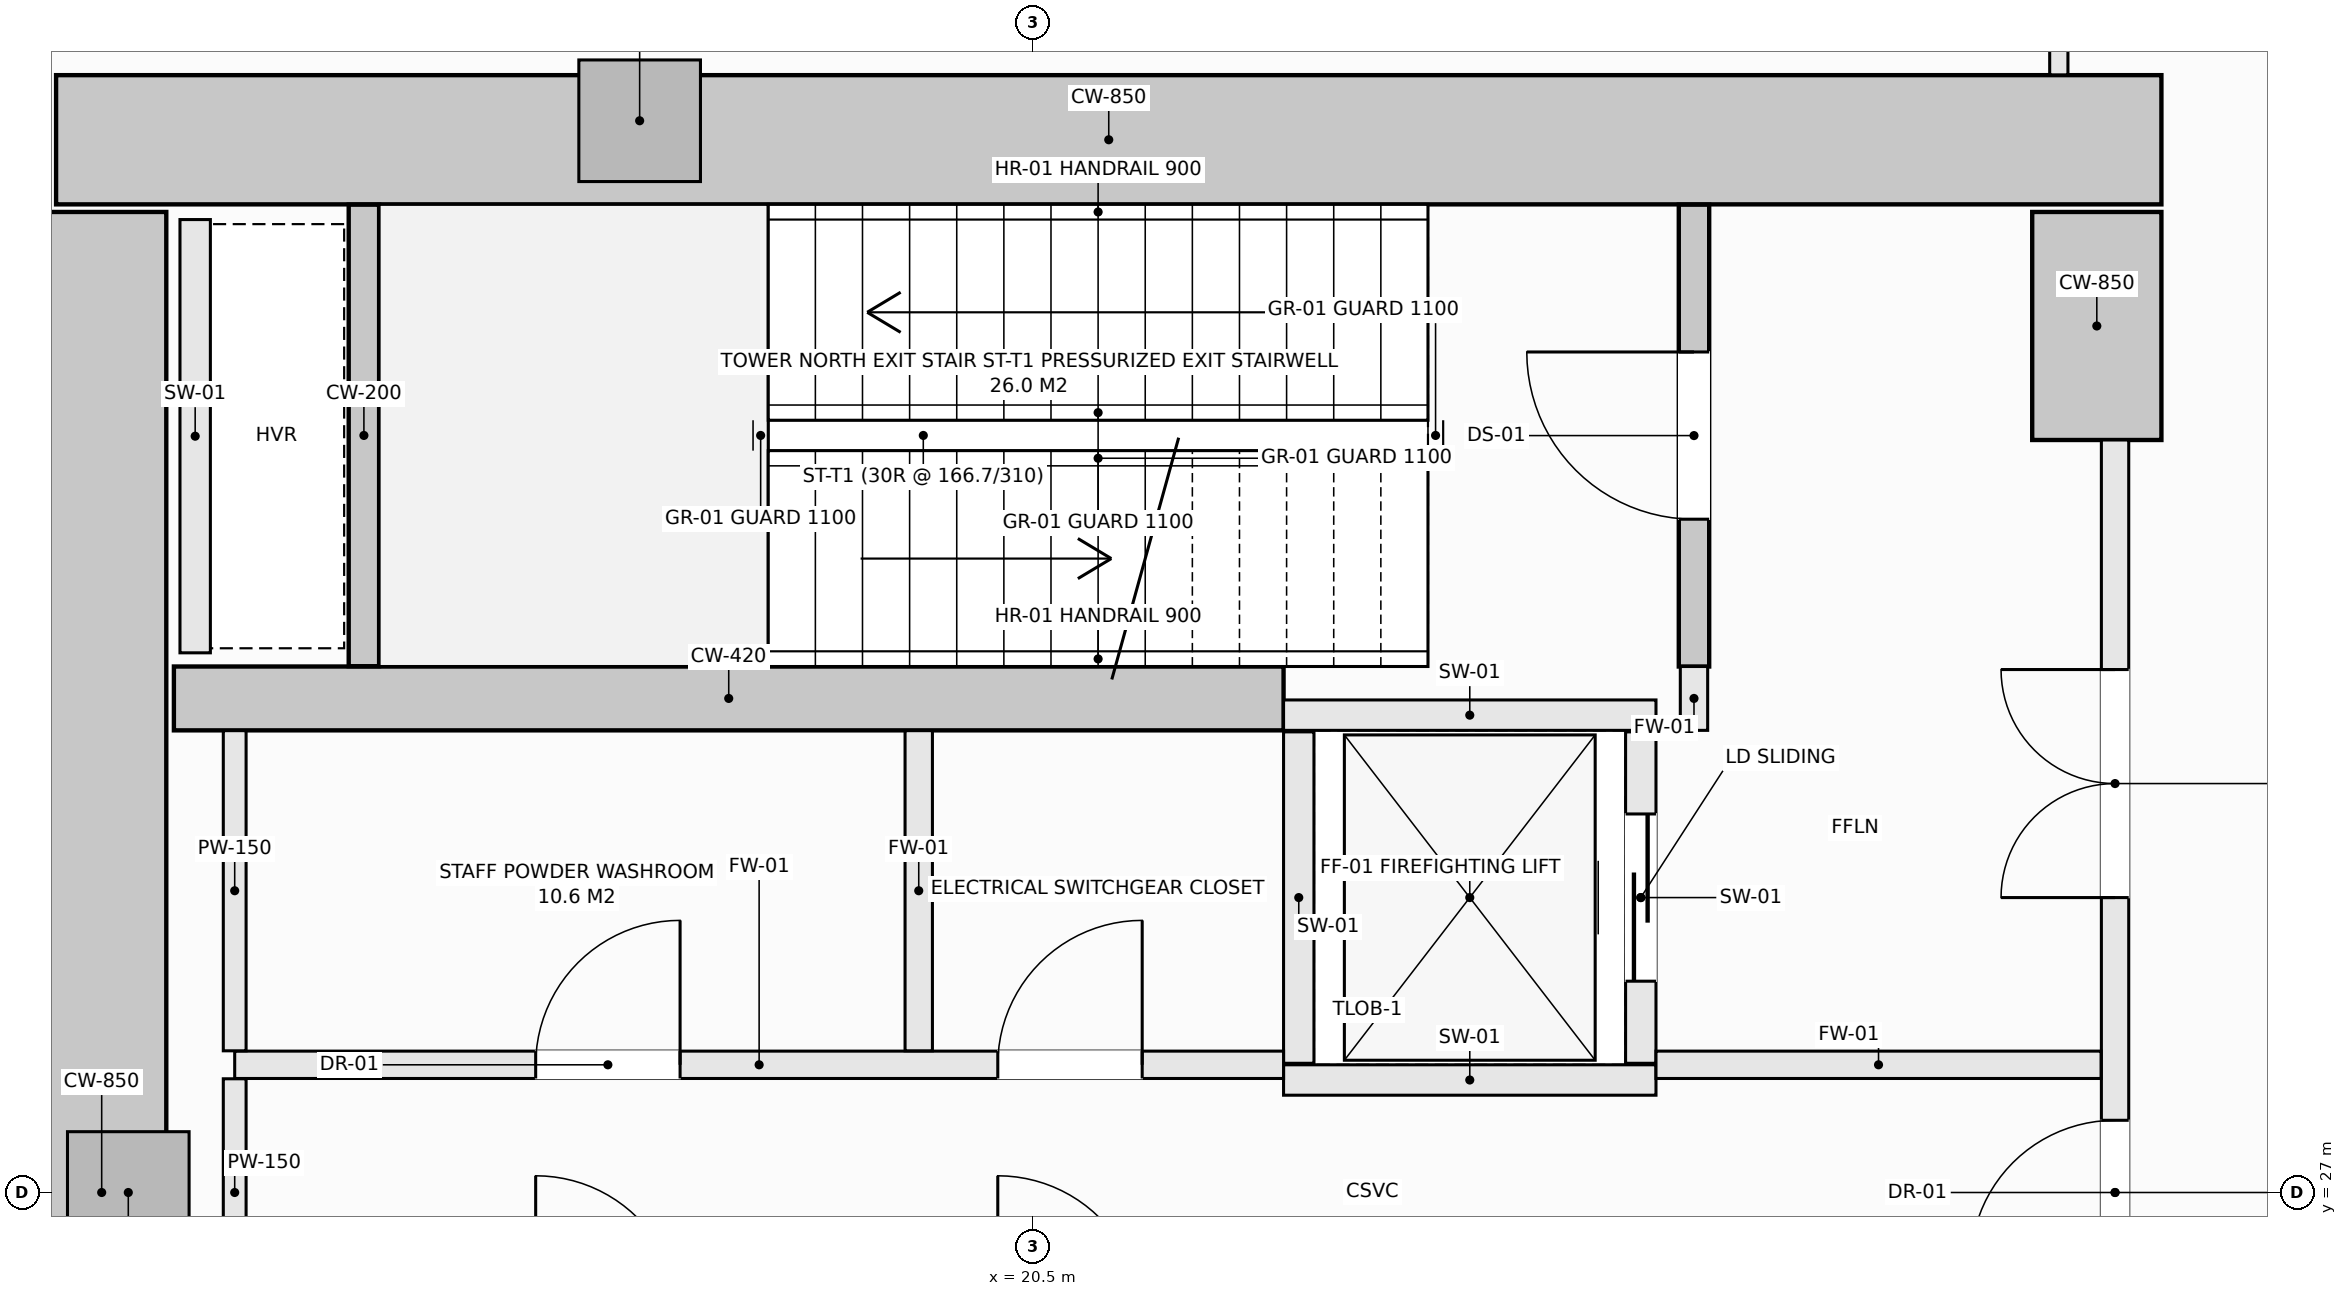
"""IFC4 building model, lengths in metres.
Left out: names, types, materials, properties, quantities, classifications, styles, units other than length and angle.
Written with IfcOpenShell. Run it as: python <this file> out.ifc"""

import sys

from ifc_helpers import new_model, si_unit, direction, frame, frame_2d, origin, origin_2d, place, context, subcontext, project, spatial, rectangle, extrude, element, fill, save


model = new_model("IFC4")
c1 = context("Model", 3, precision=1e-05, world=origin(), true_north=direction((0.0, 1.0)))
c2 = subcontext(c1, "Body", "Model", "MODEL_VIEW")
j1 = project(units=[si_unit("LENGTHUNIT", "METRE"), si_unit("PLANEANGLEUNIT", "RADIAN")], contexts=[c1])
p1 = place(None, origin())
s1 = spatial("IfcSite", under=j1, at=p1, CompositionType="ELEMENT")
p2 = place(p1, origin())
s2 = spatial("IfcBuilding", under=s1, at=p2, CompositionType="ELEMENT")
p3 = place(p2, origin())
s3 = spatial("IfcBuildingStorey", under=s2, at=p3, CompositionType="ELEMENT", Elevation=0.0)
p4 = place(p3, frame((14.075, 33.925, -0.36), z_axis=(0.0, 0.0, 1.0), x_axis=(1.0, 0.0, 0.0)))
e1 = element("IfcWall", 1, at=p4, inside=s3, PredefinedType="SHEAR", context=c2, shape_type="SweptSolid", body=[
    extrude(rectangle(XDim=13.85, YDim=0.85, at=frame_2d((6.925, 0.0))), origin(), (0.0, 0.0, 1.0), 5.1),
])
p5 = place(p3, frame((14.375, 20.55, -0.36), z_axis=(0.0, 0.0, 1.0), x_axis=(0.0, 1.0, 0.0)))
e2 = element("IfcWall", 2, at=p5, inside=s3, PredefinedType="SHEAR", context=c2, shape_type="SweptSolid", body=[
    extrude(rectangle(XDim=12.9, YDim=0.85, at=frame_2d((6.45, 0.0))), origin(), (0.0, 0.0, 1.0), 5.1),
])
p6 = place(p3, frame((27.5, 31.95, -0.36), z_axis=(0.0, 0.0, 1.0), x_axis=(0.0, 1.0, 0.0)))
e3 = element("IfcWall", 3, at=p6, inside=s3, PredefinedType="SHEAR", context=c2, shape_type="SweptSolid", body=[
    extrude(rectangle(XDim=1.5, YDim=0.85, at=frame_2d((0.75, 0.0))), origin(), (0.0, 0.0, 1.0), 5.1),
])
p7 = place(p3, frame((14.85, 30.25, -0.36), z_axis=(0.0, 0.0, 1.0), x_axis=(1.0, 0.0, 0.0)))
e4 = element("IfcWall", 4, at=p7, inside=s3, PredefinedType="SHEAR", context=c2, shape_type="SweptSolid", body=[
    extrude(rectangle(XDim=7.3, YDim=0.42, at=frame_2d((3.65, 0.0))), origin(), (0.0, 0.0, 1.0), 5.1),
])
for number, where, z_axis, x_axis in (
    (5, (17.914, 34.05, -0.36), (0.0, 0.0, 1.0), (1.0, 0.0, 0.0)),
    (6, (14.55, 27.0, -0.36), (0.0, 0.0, 1.0), (1.0, 0.0, 0.0)),
):
    element("IfcColumn", number, at=place(p3, frame(where, z_axis=z_axis, x_axis=x_axis)), inside=s3, PredefinedType="PILASTER", context=c2, shape_type="SweptSolid", body=[
        extrude(rectangle(XDim=0.8, YDim=0.8, at=origin_2d()), origin(), (0.0, 0.0, 1.0), 5.1),
    ])
p8 = place(p3, frame((24.85, 30.46, -0.36), z_axis=(0.0, 0.0, 1.0), x_axis=(0.0, 1.0, 0.0)))
e7 = element("IfcWall", 7, at=p8, inside=s3, PredefinedType="SHEAR", context=c2, shape_type="SweptSolid", body=[
    extrude(rectangle(XDim=3.038, YDim=0.2, at=frame_2d((1.519, 0.0))), origin(), (0.0, 0.0, 1.0), 5.1),
])
p9 = place(p8, frame((0.969, 0.0, 0.36)))
e8 = element("IfcOpeningElement", 8, at=p9, cuts=e7, PredefinedType="OPENING", context=c2, shape_type="SweptSolid", body=[
    extrude(rectangle(XDim=1.1, YDim=2.15, at=frame_2d((0.55, 1.075))), frame((0.0, 0.11, 0.0), z_axis=(0.0, -1.0, 0.0), x_axis=(1.0, 0.0, 0.0)), (0.0, 0.0, 1.0), 0.22),
])
p10 = place(p3, frame((16.1, 30.462, -0.36), z_axis=(0.0, 0.0, 1.0), x_axis=(0.0, 1.0, 0.0)))
e9 = element("IfcWall", 9, at=p10, inside=s3, PredefinedType="SHEAR", context=c2, shape_type="SweptSolid", body=[
    extrude(rectangle(XDim=3.036, YDim=0.2, at=frame_2d((1.518, 0.0))), origin(), (0.0, 0.0, 1.0), 5.1),
])
for number, where, z_axis, x_axis in (
    (10, (22.15, 30.14, 0.0), (0.0, 0.0, 1.0), (1.0, 0.0, 0.0)),
    (11, (22.15, 27.74, 0.0), (0.0, 0.0, 1.0), (1.0, 0.0, 0.0)),
):
    element("IfcWall", number, at=place(p3, frame(where, z_axis=z_axis, x_axis=x_axis)), inside=s3, PredefinedType="SOLIDWALL", context=c2, shape_type="SweptSolid", body=[
        extrude(rectangle(XDim=2.45, YDim=0.2, at=frame_2d((1.225, 0.0))), origin(), (0.0, 0.0, 1.0), 4.74),
    ])
p11 = place(p3, frame((22.25, 27.85, 0.0), z_axis=(0.0, 0.0, 1.0), x_axis=(0.0, 1.0, 0.0)))
e12 = element("IfcWall", 12, at=p11, inside=s3, PredefinedType="SOLIDWALL", context=c2, shape_type="SweptSolid", body=[
    extrude(rectangle(XDim=2.18, YDim=0.2, at=frame_2d((1.09, 0.0))), origin(), (0.0, 0.0, 1.0), 4.74),
])
p12 = place(p3, frame((24.5, 27.85, 0.0), z_axis=(0.0, 0.0, 1.0), x_axis=(0.0, 1.0, 0.0)))
e13 = element("IfcWall", 13, at=p12, inside=s3, PredefinedType="SOLIDWALL", context=c2, shape_type="SweptSolid", body=[
    extrude(rectangle(XDim=2.18, YDim=0.2, at=frame_2d((1.09, 0.0))), origin(), (0.0, 0.0, 1.0), 4.74),
])
p13 = place(p12, frame((0.54, 0.0, 0.0)))
e14 = element("IfcOpeningElement", 14, at=p13, cuts=e13, PredefinedType="OPENING", context=c2, shape_type="SweptSolid", body=[
    extrude(rectangle(XDim=1.1, YDim=2.2, at=frame_2d((0.55, 1.1))), frame((0.0, 0.11, 0.0), z_axis=(0.0, -1.0, 0.0), x_axis=(1.0, 0.0, 0.0)), (0.0, 0.0, 1.0), 0.22),
])
p14 = place(p3, frame((14.99, 30.55, 0.0), z_axis=(0.0, 0.0, 1.0), x_axis=(0.0, 1.0, 0.0)))
e15 = element("IfcWall", 15, at=p14, inside=s3, PredefinedType="SOLIDWALL", context=c2, shape_type="SweptSolid", body=[
    extrude(rectangle(XDim=2.85, YDim=0.2, at=frame_2d((1.425, 0.0))), origin(), (0.0, 0.0, 1.0), 4.74),
])
p15 = place(p3, frame((24.85, 30.04, 0.0), z_axis=(0.0, 0.0, 1.0), x_axis=(0.0, 1.0, 0.0)))
e16 = element("IfcWall", 16, at=p15, inside=s3, PredefinedType="SOLIDWALL", context=c2, shape_type="SweptSolid", body=[
    extrude(rectangle(XDim=0.42, YDim=0.18, at=frame_2d((0.21, 0.0))), origin(), (0.0, 0.0, 1.0), 4.74),
])
p16 = place(p3, frame((27.62, 22.05, 0.0), z_axis=(0.0, 0.0, 1.0), x_axis=(0.0, 1.0, 0.0)))
e17 = element("IfcWall", 17, at=p16, inside=s3, PredefinedType="SOLIDWALL", context=c2, shape_type="SweptSolid", body=[
    extrude(rectangle(XDim=9.9, YDim=0.18, at=frame_2d((4.95, 0.0))), origin(), (0.0, 0.0, 1.0), 3.832),
])
p17 = place(p16, frame((4.475, 0.0, 0.0)))
e18 = element("IfcOpeningElement", 18, at=p17, cuts=e17, PredefinedType="OPENING", context=c2, shape_type="SweptSolid", body=[
    extrude(rectangle(XDim=0.95, YDim=2.1, at=frame_2d((0.475, 1.05))), frame((0.0, 0.1, 0.0), z_axis=(0.0, -1.0, 0.0), x_axis=(1.0, 0.0, 0.0)), (0.0, 0.0, 1.0), 0.2),
])
p18 = place(p16, frame((6.89, 0.0, 0.0)))
e19 = element("IfcOpeningElement", 19, at=p18, cuts=e17, PredefinedType="OPENING", context=c2, shape_type="SweptSolid", body=[
    extrude(rectangle(XDim=1.5, YDim=2.2, at=frame_2d((0.75, 1.1))), frame((0.0, 0.1, 0.0), z_axis=(0.0, -1.0, 0.0), x_axis=(1.0, 0.0, 0.0)), (0.0, 0.0, 1.0), 0.2),
])
p19 = place(p16, frame((1.51, 0.0, 0.0)))
e20 = element("IfcOpeningElement", 20, at=p19, cuts=e17, PredefinedType="OPENING", context=c2, shape_type="SweptSolid", body=[
    extrude(rectangle(XDim=1.5, YDim=2.2, at=frame_2d((0.75, 1.1))), frame((0.0, 0.1, 0.0), z_axis=(0.0, -1.0, 0.0), x_axis=(1.0, 0.0, 0.0)), (0.0, 0.0, 1.0), 0.2),
])
p20 = place(p3, frame((15.25, 27.84, 0.0), z_axis=(0.0, 0.0, 1.0), x_axis=(1.0, 0.0, 0.0)))
e21 = element("IfcWall", 21, at=p20, inside=s3, PredefinedType="SOLIDWALL", context=c2, shape_type="SweptSolid", body=[
    extrude(rectangle(XDim=6.9, YDim=0.18, at=frame_2d((3.45, 0.0))), origin(), (0.0, 0.0, 1.0), 4.74),
])
p21 = place(p20, frame((5.02, 0.0, 0.0)))
e22 = element("IfcOpeningElement", 22, at=p21, cuts=e21, PredefinedType="OPENING", context=c2, shape_type="SweptSolid", body=[
    extrude(rectangle(XDim=0.95, YDim=2.1, at=frame_2d((0.475, 1.05))), frame((0.0, 0.1, 0.0), z_axis=(0.0, -1.0, 0.0), x_axis=(1.0, 0.0, 0.0)), (0.0, 0.0, 1.0), 0.2),
])
p22 = place(p20, frame((1.98, 0.0, 0.0)))
e23 = element("IfcOpeningElement", 23, at=p22, cuts=e21, PredefinedType="OPENING", context=c2, shape_type="SweptSolid", body=[
    extrude(rectangle(XDim=0.95, YDim=2.1, at=frame_2d((0.475, 1.05))), frame((0.0, 0.1, 0.0), z_axis=(0.0, -1.0, 0.0), x_axis=(1.0, 0.0, 0.0)), (0.0, 0.0, 1.0), 0.2),
])
p23 = place(p3, frame((24.6, 27.84, 0.0), z_axis=(0.0, 0.0, 1.0), x_axis=(1.0, 0.0, 0.0)))
e24 = element("IfcWall", 24, at=p23, inside=s3, PredefinedType="SOLIDWALL", context=c2, shape_type="SweptSolid", body=[
    extrude(rectangle(XDim=2.928, YDim=0.18, at=frame_2d((1.464, 0.0))), origin(), (0.0, 0.0, 1.0), 4.74),
])
p24 = place(p3, frame((15.25, 26.252, 0.0), z_axis=(0.0, 0.0, 1.0), x_axis=(0.0, 1.0, 0.0)))
e25 = element("IfcWall", 25, at=p24, inside=s3, PredefinedType="PARTITIONING", context=c2, shape_type="SweptSolid", body=[
    extrude(rectangle(XDim=1.496, YDim=0.15, at=frame_2d((0.748, 0.0))), origin(), (0.0, 0.0, 1.0), 4.74),
])
p25 = place(p3, frame((15.25, 27.932, 0.0), z_axis=(0.0, 0.0, 1.0), x_axis=(0.0, 1.0, 0.0)))
e26 = element("IfcWall", 26, at=p25, inside=s3, PredefinedType="PARTITIONING", context=c2, shape_type="SweptSolid", body=[
    extrude(rectangle(XDim=2.106, YDim=0.15, at=frame_2d((1.053, 0.0))), origin(), (0.0, 0.0, 1.0), 4.74),
])
p26 = place(p3, frame((19.75, 27.932, 0.0), z_axis=(0.0, 0.0, 1.0), x_axis=(0.0, 1.0, 0.0)))
e27 = element("IfcWall", 27, at=p26, inside=s3, PredefinedType="SOLIDWALL", context=c2, shape_type="SweptSolid", body=[
    extrude(rectangle(XDim=2.106, YDim=0.18, at=frame_2d((1.053, 0.0))), origin(), (0.0, 0.0, 1.0), 4.74),
])
p27 = place(p3, frame((27.25, 34.352, 0.0), z_axis=(0.0, 0.0, 1.0), x_axis=(0.0, 1.0, 0.0)))
e28 = element("IfcWall", 28, at=p27, inside=s3, PredefinedType="PARTITIONING", context=c2, shape_type="SweptSolid", body=[
    extrude(rectangle(XDim=0.606, YDim=0.12, at=frame_2d((0.303, 0.0))), origin(), (0.0, 0.0, 1.0), 4.74),
])
p28 = place(p9, origin())
e29 = element("IfcDoor", 29, at=p28, inside=s3, OperationType="SINGLE_SWING_RIGHT", PredefinedType="DOOR", context=c2, shape_type="SweptSolid", body=[
    extrude(rectangle(XDim=1.1, YDim=2.15, at=frame_2d((0.55, 1.075))), frame((0.0, 0.025, 0.0), z_axis=(0.0, -1.0, 0.0), x_axis=(1.0, 0.0, 0.0)), (0.0, 0.0, 1.0), 0.05),
])
fill(e8, e29)
p29 = place(p13, origin())
e30 = element("IfcDoor", 30, at=p29, inside=s3, OperationType="SLIDING_TO_LEFT", PredefinedType="DOOR", context=c2, shape_type="SweptSolid", body=[
    extrude(rectangle(XDim=1.1, YDim=2.2, at=frame_2d((0.55, 1.1))), frame((0.0, 0.025, 0.0), z_axis=(0.0, -1.0, 0.0), x_axis=(1.0, 0.0, 0.0)), (0.0, 0.0, 1.0), 0.05),
])
fill(e14, e30)
p30 = place(p17, origin())
e31 = element("IfcDoor", 31, at=p30, inside=s3, OperationType="SINGLE_SWING_LEFT", PredefinedType="DOOR", context=c2, shape_type="SweptSolid", body=[
    extrude(rectangle(XDim=0.95, YDim=2.1, at=frame_2d((0.475, 1.05))), frame((0.0, 0.025, 0.0), z_axis=(0.0, -1.0, 0.0), x_axis=(1.0, 0.0, 0.0)), (0.0, 0.0, 1.0), 0.05),
])
fill(e18, e31)
p31 = place(p18, origin())
e32 = element("IfcDoor", 32, at=p31, inside=s3, OperationType="DOUBLE_DOOR_SINGLE_SWING", PredefinedType="DOOR", context=c2, shape_type="SweptSolid", body=[
    extrude(rectangle(XDim=1.5, YDim=2.2, at=frame_2d((0.75, 1.1))), frame((0.0, 0.025, 0.0), z_axis=(0.0, -1.0, 0.0), x_axis=(1.0, 0.0, 0.0)), (0.0, 0.0, 1.0), 0.05),
])
fill(e19, e32)
p32 = place(p21, origin())
e33 = element("IfcDoor", 33, at=p32, inside=s3, OperationType="SINGLE_SWING_RIGHT", PredefinedType="DOOR", context=c2, shape_type="SweptSolid", body=[
    extrude(rectangle(XDim=0.95, YDim=2.1, at=frame_2d((0.475, 1.05))), frame((0.0, 0.025, 0.0), z_axis=(0.0, -1.0, 0.0), x_axis=(1.0, 0.0, 0.0)), (0.0, 0.0, 1.0), 0.05),
])
fill(e22, e33)
p33 = place(p22, origin())
e34 = element("IfcDoor", 34, at=p33, inside=s3, OperationType="SINGLE_SWING_RIGHT", PredefinedType="DOOR", context=c2, shape_type="SweptSolid", body=[
    extrude(rectangle(XDim=0.95, YDim=2.1, at=frame_2d((0.475, 1.05))), frame((0.0, 0.025, 0.0), z_axis=(0.0, -1.0, 0.0), x_axis=(1.0, 0.0, 0.0)), (0.0, 0.0, 1.0), 0.05),
])
fill(e23, e34)
save(model, sys.argv[1])
